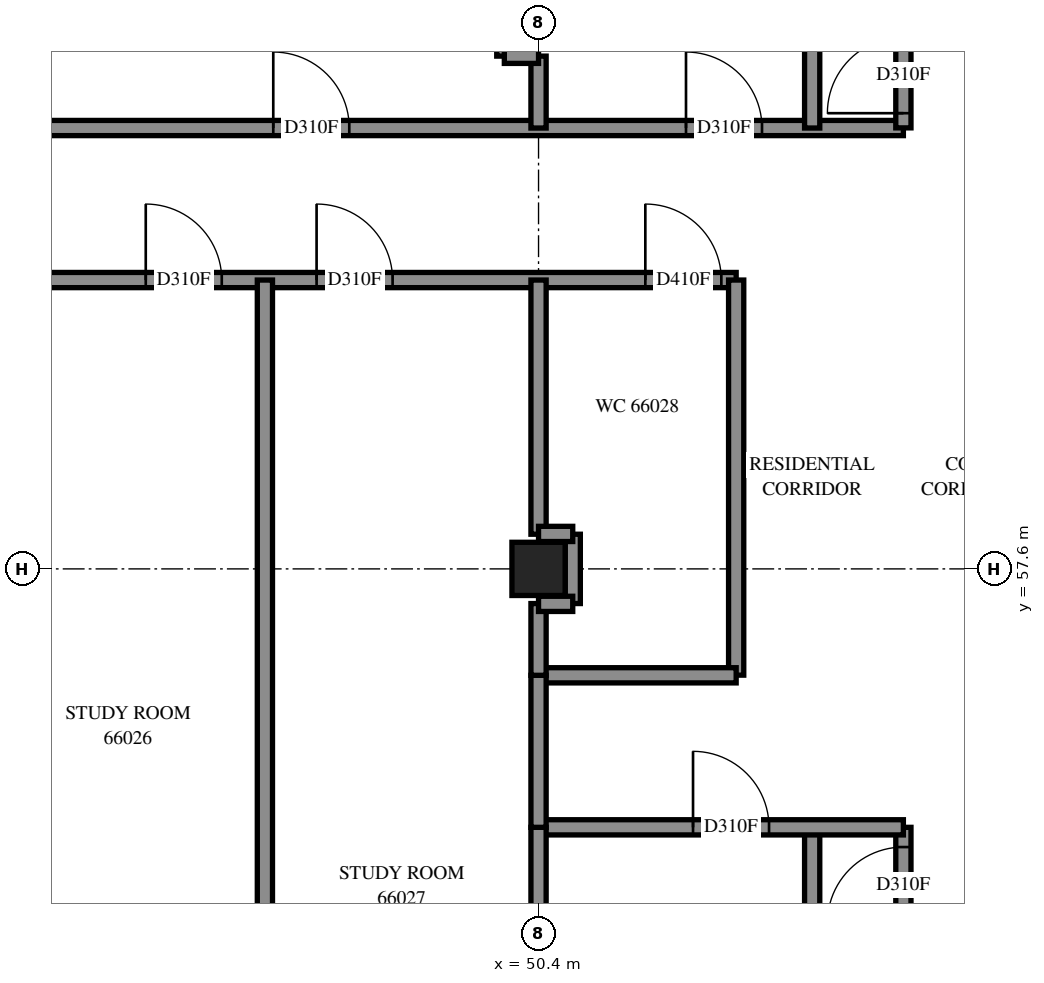
"""IFC4 building model, lengths in metres.
Left out: names, types, materials, properties, quantities, classifications, styles, units other than length and angle.
Written with IfcOpenShell. Run it as: python <this file> out.ifc"""

import sys

from ifc_helpers import new_model, si_unit, direction, frame, frame_2d, origin, origin_2d, place, context, subcontext, project, spatial, rectangle, extrude, element, fill, save


model = new_model("IFC4")
c1 = context("Model", 3, precision=1e-05, world=origin(), true_north=direction((0.0, 1.0)))
c2 = subcontext(c1, "Body", "Model", "MODEL_VIEW")
j1 = project(units=[si_unit("LENGTHUNIT", "METRE"), si_unit("PLANEANGLEUNIT", "RADIAN")], contexts=[c1])
p1 = place(None, origin())
s1 = spatial("IfcSite", under=j1, at=p1, CompositionType="ELEMENT")
p2 = place(p1, origin())
s2 = spatial("IfcBuilding", under=s1, at=p2, CompositionType="ELEMENT")
p3 = place(p2, frame((0.0, 0.0, 243.8)))
s3 = spatial("IfcBuildingStorey", under=s2, at=p3, CompositionType="ELEMENT", Elevation=243.8)
p4 = place(p3, frame((50.4, 57.6, 0.0), z_axis=(0.0, 0.0, 1.0), x_axis=(1.0, 0.0, 0.0)))
e1 = element("IfcColumn", 1, at=p4, inside=s3, PredefinedType="COLUMN", context=c2, shape_type="SweptSolid", body=[
    extrude(rectangle(XDim=0.7, YDim=0.7, at=origin_2d()), origin(), (0.0, 0.0, 1.0), 3.1),
])
p5 = place(p3, frame((36.0, 61.4, 0.0), z_axis=(0.0, 0.0, 1.0), x_axis=(1.0, 0.0, 0.0)))
e2 = element("IfcWall", 2, at=p5, inside=s3, PredefinedType="PARTITIONING", context=c2, shape_type="SweptSolid", body=[
    extrude(rectangle(XDim=17.0, YDim=0.2, at=frame_2d((8.5, 0.0))), origin(), (0.0, 0.0, 1.0), 3.1),
])
p6 = place(p5, frame((2.033, 0.0, 0.0)))
e3 = element("IfcOpeningElement", 3, at=p6, cuts=e2, PredefinedType="OPENING", context=c2, shape_type="SweptSolid", body=[
    extrude(rectangle(XDim=1.0, YDim=2.1, at=frame_2d((0.5, 1.05))), frame((0.0, 0.11, 0.0), z_axis=(0.0, -1.0, 0.0), x_axis=(1.0, 0.0, 0.0)), (0.0, 0.0, 1.0), 0.22),
])
p7 = place(p5, frame((4.107, 0.0, 0.0)))
e4 = element("IfcOpeningElement", 4, at=p7, cuts=e2, PredefinedType="OPENING", context=c2, shape_type="SweptSolid", body=[
    extrude(rectangle(XDim=1.0, YDim=2.1, at=frame_2d((0.5, 1.05))), frame((0.0, 0.11, 0.0), z_axis=(0.0, -1.0, 0.0), x_axis=(1.0, 0.0, 0.0)), (0.0, 0.0, 1.0), 0.22),
])
p8 = place(p5, frame((9.232, 0.0, 0.0)))
e5 = element("IfcOpeningElement", 5, at=p8, cuts=e2, PredefinedType="OPENING", context=c2, shape_type="SweptSolid", body=[
    extrude(rectangle(XDim=1.0, YDim=2.1, at=frame_2d((0.5, 1.05))), frame((0.0, 0.11, 0.0), z_axis=(0.0, -1.0, 0.0), x_axis=(1.0, 0.0, 0.0)), (0.0, 0.0, 1.0), 0.22),
])
p9 = place(p5, frame((11.48, 0.0, 0.0)))
e6 = element("IfcOpeningElement", 6, at=p9, cuts=e2, PredefinedType="OPENING", context=c2, shape_type="SweptSolid", body=[
    extrude(rectangle(XDim=1.0, YDim=2.1, at=frame_2d((0.5, 1.05))), frame((0.0, 0.11, 0.0), z_axis=(0.0, -1.0, 0.0), x_axis=(1.0, 0.0, 0.0)), (0.0, 0.0, 1.0), 0.22),
])
p10 = place(p5, frame((15.805, 0.0, 0.0)))
e7 = element("IfcOpeningElement", 7, at=p10, cuts=e2, PredefinedType="OPENING", context=c2, shape_type="SweptSolid", body=[
    extrude(rectangle(XDim=1.0, YDim=2.1, at=frame_2d((0.5, 1.05))), frame((0.0, 0.11, 0.0), z_axis=(0.0, -1.0, 0.0), x_axis=(1.0, 0.0, 0.0)), (0.0, 0.0, 1.0), 0.22),
])
p11 = place(p3, frame((40.61, 63.4, 0.0), z_axis=(0.0, 0.0, 1.0), x_axis=(1.0, 0.0, 0.0)))
e8 = element("IfcWall", 8, at=p11, inside=s3, PredefinedType="PARTITIONING", context=c2, shape_type="SweptSolid", body=[
    extrude(rectangle(XDim=14.59, YDim=0.2, at=frame_2d((7.295, 0.0))), origin(), (0.0, 0.0, 1.0), 3.1),
])
p12 = place(p11, frame((6.3, 0.0, 0.0)))
e9 = element("IfcOpeningElement", 9, at=p12, cuts=e8, PredefinedType="OPENING", context=c2, shape_type="SweptSolid", body=[
    extrude(rectangle(XDim=1.0, YDim=2.1, at=frame_2d((0.5, 1.05))), frame((0.0, 0.11, 0.0), z_axis=(0.0, -1.0, 0.0), x_axis=(1.0, 0.0, 0.0)), (0.0, 0.0, 1.0), 0.22),
])
p13 = place(p11, frame((11.73, 0.0, 0.0)))
e10 = element("IfcOpeningElement", 10, at=p13, cuts=e8, PredefinedType="OPENING", context=c2, shape_type="SweptSolid", body=[
    extrude(rectangle(XDim=1.0, YDim=2.1, at=frame_2d((0.5, 1.05))), frame((0.0, 0.11, 0.0), z_axis=(0.0, -1.0, 0.0), x_axis=(1.0, 0.0, 0.0)), (0.0, 0.0, 1.0), 0.22),
])
p14 = place(p3, frame((54.0, 42.35, 0.0), z_axis=(0.0, 0.0, 1.0), x_axis=(0.0, 1.0, 0.0)))
e11 = element("IfcWall", 11, at=p14, inside=s3, PredefinedType="PARTITIONING", context=c2, shape_type="SweptSolid", body=[
    extrude(rectangle(XDim=11.85, YDim=0.2, at=frame_2d((5.925, 0.0))), origin(), (0.0, 0.0, 1.0), 3.1),
])
p15 = place(p3, frame((46.8, 49.65, 0.0), z_axis=(0.0, 0.0, 1.0), x_axis=(0.0, 1.0, 0.0)))
e12 = element("IfcWall", 12, at=p15, inside=s3, PredefinedType="PARTITIONING", context=c2, shape_type="SweptSolid", body=[
    extrude(rectangle(XDim=11.75, YDim=0.2, at=frame_2d((5.875, 0.0))), origin(), (0.0, 0.0, 1.0), 3.1),
])
p16 = place(p3, frame((54.0, 63.4, 0.0), z_axis=(0.0, 0.0, 1.0), x_axis=(0.0, 1.0, 0.0)))
e13 = element("IfcWall", 13, at=p16, inside=s3, PredefinedType="PARTITIONING", context=c2, shape_type="SweptSolid", body=[
    extrude(rectangle(XDim=9.397, YDim=0.2, at=frame_2d((4.699, 0.0))), origin(), (0.0, 0.0, 1.0), 3.1),
])
p17 = place(p3, frame((55.2, 48.0, 0.0), z_axis=(0.0, 0.0, 1.0), x_axis=(0.0, 1.0, 0.0)))
e14 = element("IfcWall", 14, at=p17, inside=s3, PredefinedType="PARTITIONING", context=c2, shape_type="SweptSolid", body=[
    extrude(rectangle(XDim=6.2, YDim=0.2, at=frame_2d((3.1, 0.0))), origin(), (0.0, 0.0, 1.0), 3.1),
])
p18 = place(p17, frame((4.94, 0.0, 0.0)))
e15 = element("IfcOpeningElement", 15, at=p18, cuts=e14, PredefinedType="OPENING", context=c2, shape_type="SweptSolid", body=[
    extrude(rectangle(XDim=1.0, YDim=2.1, at=frame_2d((0.5, 1.05))), frame((0.0, 0.11, 0.0), z_axis=(0.0, -1.0, 0.0), x_axis=(1.0, 0.0, 0.0)), (0.0, 0.0, 1.0), 0.22),
])
p19 = place(p3, frame((53.0, 56.202, 0.0), z_axis=(0.0, 0.0, 1.0), x_axis=(0.0, 1.0, 0.0)))
e16 = element("IfcWall", 16, at=p19, inside=s3, PredefinedType="PARTITIONING", context=c2, shape_type="SweptSolid", body=[
    extrude(rectangle(XDim=5.198, YDim=0.2, at=frame_2d((2.599, 0.0))), origin(), (0.0, 0.0, 1.0), 3.1),
])
p20 = place(p3, frame((50.4, 54.2, 0.0), z_axis=(0.0, 0.0, 1.0), x_axis=(1.0, 0.0, 0.0)))
e17 = element("IfcWall", 17, at=p20, inside=s3, PredefinedType="PARTITIONING", context=c2, shape_type="SweptSolid", body=[
    extrude(rectangle(XDim=4.8, YDim=0.2, at=frame_2d((2.4, 0.0))), origin(), (0.0, 0.0, 1.0), 3.1),
])
p21 = place(p20, frame((2.033, 0.0, 0.0)))
e18 = element("IfcOpeningElement", 18, at=p21, cuts=e17, PredefinedType="OPENING", context=c2, shape_type="SweptSolid", body=[
    extrude(rectangle(XDim=1.0, YDim=2.1, at=frame_2d((0.5, 1.05))), frame((0.0, 0.11, 0.0), z_axis=(0.0, -1.0, 0.0), x_axis=(1.0, 0.0, 0.0)), (0.0, 0.0, 1.0), 0.22),
])
p22 = place(p3, frame((55.2, 63.402, 0.0), z_axis=(0.0, 0.0, 1.0), x_axis=(0.0, 1.0, 0.0)))
e19 = element("IfcWall", 19, at=p22, inside=s3, PredefinedType="PARTITIONING", context=c2, shape_type="SweptSolid", body=[
    extrude(rectangle(XDim=3.798, YDim=0.2, at=frame_2d((1.899, 0.0))), origin(), (0.0, 0.0, 1.0), 3.1),
])
p23 = place(p22, frame((0.193, 0.0, 0.0)))
e20 = element("IfcOpeningElement", 20, at=p23, cuts=e19, PredefinedType="OPENING", context=c2, shape_type="SweptSolid", body=[
    extrude(rectangle(XDim=1.0, YDim=2.1, at=frame_2d((0.5, 1.05))), frame((0.0, 0.11, 0.0), z_axis=(0.0, -1.0, 0.0), x_axis=(1.0, 0.0, 0.0)), (0.0, 0.0, 1.0), 0.22),
])
p24 = place(p3, frame((50.4, 50.75, 0.0), z_axis=(0.0, 0.0, 1.0), x_axis=(0.0, 1.0, 0.0)))
e21 = element("IfcWall", 21, at=p24, inside=s3, PredefinedType="PARTITIONING", context=c2, shape_type="SweptSolid", body=[
    extrude(rectangle(XDim=3.45, YDim=0.2, at=frame_2d((1.725, 0.0))), origin(), (0.0, 0.0, 1.0), 3.1),
])
p25 = place(p3, frame((50.4, 58.056, 0.0), z_axis=(0.0, 0.0, 1.0), x_axis=(0.0, 1.0, 0.0)))
e22 = element("IfcWall", 22, at=p25, inside=s3, PredefinedType="PARTITIONING", context=c2, shape_type="SweptSolid", body=[
    extrude(rectangle(XDim=3.344, YDim=0.2, at=frame_2d((1.672, 0.0))), origin(), (0.0, 0.0, 1.0), 3.1),
])
p26 = place(p3, frame((50.4, 56.2, 0.0), z_axis=(0.0, 0.0, 1.0), x_axis=(1.0, 0.0, 0.0)))
e23 = element("IfcWall", 23, at=p26, inside=s3, PredefinedType="PARTITIONING", context=c2, shape_type="SweptSolid", body=[
    extrude(rectangle(XDim=2.6, YDim=0.2, at=frame_2d((1.3, 0.0))), origin(), (0.0, 0.0, 1.0), 3.1),
])
p27 = place(p3, frame((50.4, 54.2, 0.0), z_axis=(0.0, 0.0, 1.0), x_axis=(0.0, 1.0, 0.0)))
e24 = element("IfcWall", 24, at=p27, inside=s3, PredefinedType="PARTITIONING", context=c2, shape_type="SweptSolid", body=[
    extrude(rectangle(XDim=2.0, YDim=0.2, at=frame_2d((1.0, 0.0))), origin(), (0.0, 0.0, 1.0), 3.1),
])
p28 = place(p3, frame((50.4, 63.4, 0.0), z_axis=(0.0, 0.0, 1.0), x_axis=(0.0, 1.0, 0.0)))
e25 = element("IfcWall", 25, at=p28, inside=s3, PredefinedType="PARTITIONING", context=c2, shape_type="SweptSolid", body=[
    extrude(rectangle(XDim=0.946, YDim=0.2, at=frame_2d((0.473, 0.0))), origin(), (0.0, 0.0, 1.0), 3.1),
])
p29 = place(p3, frame((50.4, 56.2, 0.0), z_axis=(0.0, 0.0, 1.0), x_axis=(0.0, 1.0, 0.0)))
e26 = element("IfcWall", 26, at=p29, inside=s3, PredefinedType="PARTITIONING", context=c2, shape_type="SweptSolid", body=[
    extrude(rectangle(XDim=0.944, YDim=0.2, at=frame_2d((0.472, 0.0))), origin(), (0.0, 0.0, 1.0), 3.1),
])
p30 = place(p3, frame((50.85, 57.144, 0.0), z_axis=(0.0, 0.0, 1.0), x_axis=(0.0, 1.0, 0.0)))
e27 = element("IfcWall", 27, at=p30, inside=s3, PredefinedType="PARTITIONING", context=c2, shape_type="SweptSolid", body=[
    extrude(rectangle(XDim=0.912, YDim=0.2, at=frame_2d((0.456, 0.0))), origin(), (0.0, 0.0, 1.0), 3.1),
])
p31 = place(p3, frame((49.95, 64.346, 0.0), z_axis=(0.0, 0.0, 1.0), x_axis=(0.0, 1.0, 0.0)))
e28 = element("IfcWall", 28, at=p31, inside=s3, PredefinedType="PARTITIONING", context=c2, shape_type="SweptSolid", body=[
    extrude(rectangle(XDim=0.908, YDim=0.2, at=frame_2d((0.454, 0.0))), origin(), (0.0, 0.0, 1.0), 3.1),
])
for number, where, z_axis, x_axis in (
    (29, (50.4, 58.06, 0.0), (0.0, 0.0, 1.0), (1.0, 0.0, 0.0)),
    (30, (50.4, 57.14, 0.0), (0.0, 0.0, 1.0), (1.0, 0.0, 0.0)),
    (31, (49.95, 64.35, 0.0), (0.0, 0.0, 1.0), (1.0, 0.0, 0.0)),
):
    element("IfcWall", number, at=place(p3, frame(where, z_axis=z_axis, x_axis=x_axis)), inside=s3, PredefinedType="PARTITIONING", context=c2, shape_type="SweptSolid", body=[
        extrude(rectangle(XDim=0.45, YDim=0.2, at=frame_2d((0.225, 0.0))), origin(), (0.0, 0.0, 1.0), 3.1),
    ])
p32 = place(p12, origin())
e32 = element("IfcDoor", 32, at=p32, inside=s3, OperationType="SINGLE_SWING_RIGHT", PredefinedType="DOOR", context=c2, shape_type="SweptSolid", body=[
    extrude(rectangle(XDim=1.0, YDim=2.1, at=frame_2d((0.5, 1.05))), frame((0.0, 0.025, 0.0), z_axis=(0.0, -1.0, 0.0), x_axis=(1.0, 0.0, 0.0)), (0.0, 0.0, 1.0), 0.05),
])
fill(e9, e32)
p33 = place(p13, origin())
e33 = element("IfcDoor", 33, at=p33, inside=s3, OperationType="SINGLE_SWING_RIGHT", PredefinedType="DOOR", context=c2, shape_type="SweptSolid", body=[
    extrude(rectangle(XDim=1.0, YDim=2.1, at=frame_2d((0.5, 1.05))), frame((0.0, 0.025, 0.0), z_axis=(0.0, -1.0, 0.0), x_axis=(1.0, 0.0, 0.0)), (0.0, 0.0, 1.0), 0.05),
])
fill(e10, e33)
p34 = place(p23, origin())
e34 = element("IfcDoor", 34, at=p34, inside=s3, OperationType="SINGLE_SWING_LEFT", PredefinedType="DOOR", context=c2, shape_type="SweptSolid", body=[
    extrude(rectangle(XDim=1.0, YDim=2.1, at=frame_2d((0.5, 1.05))), frame((0.0, 0.025, 0.0), z_axis=(0.0, -1.0, 0.0), x_axis=(1.0, 0.0, 0.0)), (0.0, 0.0, 1.0), 0.05),
])
fill(e20, e34)
p35 = place(p8, origin())
e35 = element("IfcDoor", 35, at=p35, inside=s3, OperationType="SINGLE_SWING_LEFT", PredefinedType="DOOR", context=c2, shape_type="SweptSolid", body=[
    extrude(rectangle(XDim=1.0, YDim=2.1, at=frame_2d((0.5, 1.05))), frame((0.0, 0.025, 0.0), z_axis=(0.0, -1.0, 0.0), x_axis=(1.0, 0.0, 0.0)), (0.0, 0.0, 1.0), 0.05),
])
fill(e5, e35)
p36 = place(p9, origin())
e36 = element("IfcDoor", 36, at=p36, inside=s3, OperationType="SINGLE_SWING_RIGHT", PredefinedType="DOOR", context=c2, shape_type="SweptSolid", body=[
    extrude(rectangle(XDim=1.0, YDim=2.1, at=frame_2d((0.5, 1.05))), frame((0.0, 0.025, 0.0), z_axis=(0.0, -1.0, 0.0), x_axis=(1.0, 0.0, 0.0)), (0.0, 0.0, 1.0), 0.05),
])
fill(e6, e36)
p37 = place(p10, origin())
e37 = element("IfcDoor", 37, at=p37, inside=s3, OperationType="SINGLE_SWING_LEFT", PredefinedType="DOOR", context=c2, shape_type="SweptSolid", body=[
    extrude(rectangle(XDim=1.0, YDim=2.1, at=frame_2d((0.5, 1.05))), frame((0.0, 0.025, 0.0), z_axis=(0.0, -1.0, 0.0), x_axis=(1.0, 0.0, 0.0)), (0.0, 0.0, 1.0), 0.05),
])
fill(e7, e37)
p38 = place(p21, origin())
e38 = element("IfcDoor", 38, at=p38, inside=s3, OperationType="SINGLE_SWING_LEFT", PredefinedType="DOOR", context=c2, shape_type="SweptSolid", body=[
    extrude(rectangle(XDim=1.0, YDim=2.1, at=frame_2d((0.5, 1.05))), frame((0.0, 0.025, 0.0), z_axis=(0.0, -1.0, 0.0), x_axis=(1.0, 0.0, 0.0)), (0.0, 0.0, 1.0), 0.05),
])
fill(e18, e38)
p39 = place(p18, origin())
e39 = element("IfcDoor", 39, at=p39, inside=s3, OperationType="SINGLE_SWING_RIGHT", PredefinedType="DOOR", context=c2, shape_type="SweptSolid", body=[
    extrude(rectangle(XDim=1.0, YDim=2.1, at=frame_2d((0.5, 1.05))), frame((0.0, 0.025, 0.0), z_axis=(0.0, -1.0, 0.0), x_axis=(1.0, 0.0, 0.0)), (0.0, 0.0, 1.0), 0.05),
])
fill(e15, e39)
save(model, sys.argv[1])
